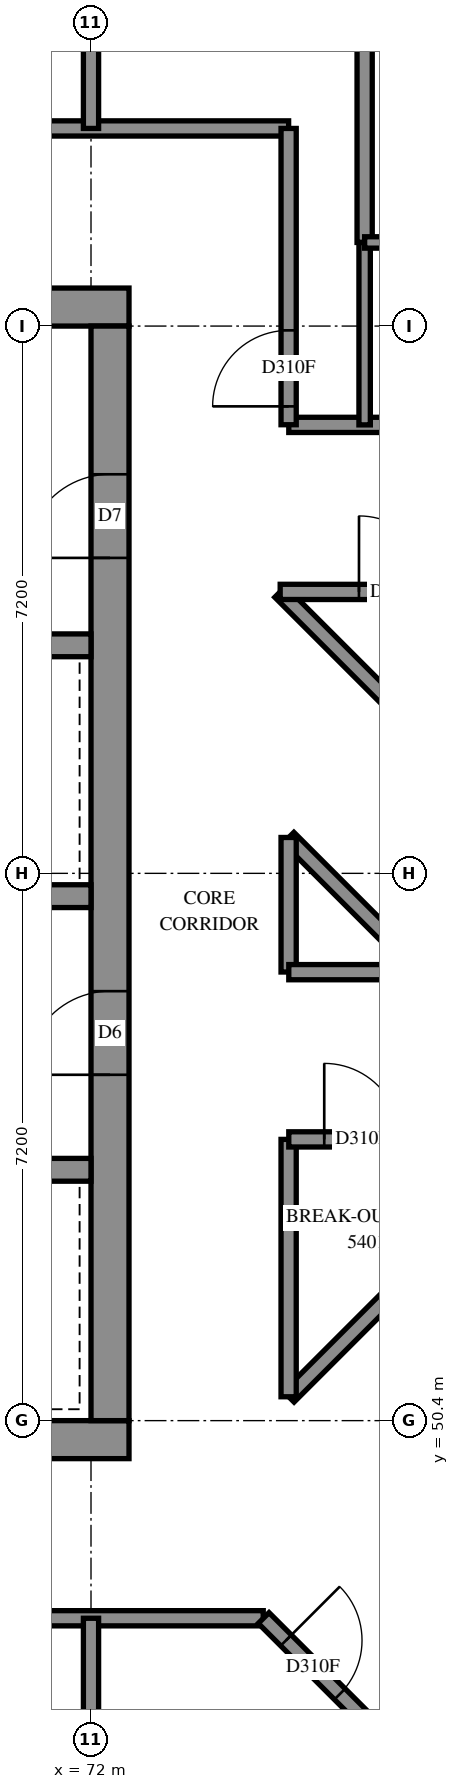
"""IFC4 building model, lengths in metres.
Left out: names, types, materials, properties, quantities, classifications, styles, units other than length and angle.
Written with IfcOpenShell. Run it as: python <this file> out.ifc"""

import sys

from ifc_helpers import new_model, si_unit, direction, frame, frame_2d, origin, place, context, subcontext, project, spatial, rectangle, extrude, element, fill, save


model = new_model("IFC4")
c1 = context("Model", 3, precision=1e-05, world=origin(), true_north=direction((0.0, 1.0)))
c2 = subcontext(c1, "Body", "Model", "MODEL_VIEW")
j1 = project(units=[si_unit("LENGTHUNIT", "METRE"), si_unit("PLANEANGLEUNIT", "RADIAN")], contexts=[c1])
p1 = place(None, origin())
s1 = spatial("IfcSite", under=j1, at=p1, CompositionType="ELEMENT")
p2 = place(p1, origin())
s2 = spatial("IfcBuilding", under=s1, at=p2, CompositionType="ELEMENT")
p3 = place(p2, frame((0.0, 0.0, 199.8)))
s3 = spatial("IfcBuildingStorey", under=s2, at=p3, CompositionType="ELEMENT", Elevation=199.8)
p4 = place(p3, frame((57.1, 50.15, -0.3), z_axis=(0.0, 0.0, 1.0), x_axis=(1.0, 0.0, 0.0)))
e1 = element("IfcWall", 1, at=p4, inside=s3, PredefinedType="SHEAR", context=c2, shape_type="SweptSolid", body=[
    extrude(rectangle(XDim=15.4, YDim=0.5, at=frame_2d((7.7, 0.0))), origin(), (0.0, 0.0, 1.0), 2.7),
])
p5 = place(p3, frame((57.1, 65.05, -0.3), z_axis=(0.0, 0.0, 1.0), x_axis=(1.0, 0.0, 0.0)))
e2 = element("IfcWall", 2, at=p5, inside=s3, PredefinedType="SHEAR", context=c2, shape_type="SweptSolid", body=[
    extrude(rectangle(XDim=15.4, YDim=0.5, at=frame_2d((7.7, 0.0))), origin(), (0.0, 0.0, 1.0), 2.7),
])
p6 = place(p5, frame((10.5, 0.0, 0.3)))
e3 = element("IfcOpeningElement", 3, at=p6, cuts=e2, PredefinedType="OPENING", context=c2, shape_type="SweptSolid", body=[
    extrude(rectangle(XDim=0.8, YDim=2.1, at=frame_2d((0.4, 1.05))), frame((0.0, 0.26, 0.0), z_axis=(0.0, -1.0, 0.0), x_axis=(1.0, 0.0, 0.0)), (0.0, 0.0, 1.0), 0.52),
])
p7 = place(p3, frame((72.25, 50.4, -0.3), z_axis=(0.0, 0.0, 1.0), x_axis=(0.0, 1.0, 0.0)))
e4 = element("IfcWall", 4, at=p7, inside=s3, PredefinedType="SHEAR", context=c2, shape_type="SweptSolid", body=[
    extrude(rectangle(XDim=14.4, YDim=0.5, at=frame_2d((7.2, 0.0))), origin(), (0.0, 0.0, 1.0), 2.7),
])
p8 = place(p7, frame((4.55, 0.0, 0.3)))
e5 = element("IfcOpeningElement", 5, at=p8, cuts=e4, PredefinedType="OPENING", context=c2, shape_type="SweptSolid", body=[
    extrude(rectangle(XDim=1.1, YDim=2.1, at=frame_2d((0.55, 1.05))), frame((0.0, 0.26, 0.0), z_axis=(0.0, -1.0, 0.0), x_axis=(1.0, 0.0, 0.0)), (0.0, 0.0, 1.0), 0.52),
])
p9 = place(p7, frame((11.35, 0.0, 0.3)))
e6 = element("IfcOpeningElement", 6, at=p9, cuts=e4, PredefinedType="OPENING", context=c2, shape_type="SweptSolid", body=[
    extrude(rectangle(XDim=1.1, YDim=2.1, at=frame_2d((0.55, 1.05))), frame((0.0, 0.26, 0.0), z_axis=(0.0, -1.0, 0.0), x_axis=(1.0, 0.0, 0.0)), (0.0, 0.0, 1.0), 0.52),
])
p10 = place(p3, frame((57.6, 53.7, 0.0), z_axis=(0.0, 0.0, 1.0), x_axis=(1.0, 0.0, 0.0)))
e7 = element("IfcWall", 7, at=p10, inside=s3, PredefinedType="SOLIDWALL", context=c2, shape_type="SweptSolid", body=[
    extrude(rectangle(XDim=14.4, YDim=0.3, at=frame_2d((7.2, 0.0))), origin(), (0.0, 0.0, 1.0), 3.1),
])
p11 = place(p10, frame((1.35, 0.0, 0.0)))
e8 = element("IfcOpeningElement", 8, at=p11, cuts=e7, PredefinedType="OPENING", context=c2, shape_type="SweptSolid", body=[
    extrude(rectangle(XDim=0.9, YDim=2.1, at=frame_2d((0.45, 1.05))), frame((0.0, 0.16, 0.0), z_axis=(0.0, -1.0, 0.0), x_axis=(1.0, 0.0, 0.0)), (0.0, 0.0, 1.0), 0.32),
])
p12 = place(p10, frame((4.95, 0.0, 0.0)))
e9 = element("IfcOpeningElement", 9, at=p12, cuts=e7, PredefinedType="OPENING", context=c2, shape_type="SweptSolid", body=[
    extrude(rectangle(XDim=0.9, YDim=2.1, at=frame_2d((0.45, 1.05))), frame((0.0, 0.16, 0.0), z_axis=(0.0, -1.0, 0.0), x_axis=(1.0, 0.0, 0.0)), (0.0, 0.0, 1.0), 0.32),
])
p13 = place(p10, frame((8.55, 0.0, 0.0)))
e10 = element("IfcOpeningElement", 10, at=p13, cuts=e7, PredefinedType="OPENING", context=c2, shape_type="SweptSolid", body=[
    extrude(rectangle(XDim=0.9, YDim=2.1, at=frame_2d((0.45, 1.05))), frame((0.0, 0.16, 0.0), z_axis=(0.0, -1.0, 0.0), x_axis=(1.0, 0.0, 0.0)), (0.0, 0.0, 1.0), 0.32),
])
p14 = place(p10, frame((12.05, 0.0, 0.0)))
e11 = element("IfcOpeningElement", 11, at=p14, cuts=e7, PredefinedType="OPENING", context=c2, shape_type="SweptSolid", body=[
    extrude(rectangle(XDim=1.1, YDim=2.1, at=frame_2d((0.55, 1.05))), frame((0.0, 0.16, 0.0), z_axis=(0.0, -1.0, 0.0), x_axis=(1.0, 0.0, 0.0)), (0.0, 0.0, 1.0), 0.32),
])
p15 = place(p3, frame((57.6, 57.3, 0.0), z_axis=(0.0, 0.0, 1.0), x_axis=(1.0, 0.0, 0.0)))
e12 = element("IfcWall", 12, at=p15, inside=s3, PredefinedType="SOLIDWALL", context=c2, shape_type="SweptSolid", body=[
    extrude(rectangle(XDim=14.4, YDim=0.3, at=frame_2d((7.2, 0.0))), origin(), (0.0, 0.0, 1.0), 3.1),
])
p16 = place(p15, frame((1.25, 0.0, 0.0)))
e13 = element("IfcOpeningElement", 13, at=p16, cuts=e12, PredefinedType="OPENING", context=c2, shape_type="SweptSolid", body=[
    extrude(rectangle(XDim=1.1, YDim=2.1, at=frame_2d((0.55, 1.05))), frame((0.0, 0.16, 0.0), z_axis=(0.0, -1.0, 0.0), x_axis=(1.0, 0.0, 0.0)), (0.0, 0.0, 1.0), 0.32),
])
p17 = place(p15, frame((4.85, 0.0, 0.0)))
e14 = element("IfcOpeningElement", 14, at=p17, cuts=e12, PredefinedType="OPENING", context=c2, shape_type="SweptSolid", body=[
    extrude(rectangle(XDim=1.1, YDim=2.1, at=frame_2d((0.55, 1.05))), frame((0.0, 0.16, 0.0), z_axis=(0.0, -1.0, 0.0), x_axis=(1.0, 0.0, 0.0)), (0.0, 0.0, 1.0), 0.32),
])
p18 = place(p15, frame((8.45, 0.0, 0.0)))
e15 = element("IfcOpeningElement", 15, at=p18, cuts=e12, PredefinedType="OPENING", context=c2, shape_type="SweptSolid", body=[
    extrude(rectangle(XDim=1.1, YDim=2.1, at=frame_2d((0.55, 1.05))), frame((0.0, 0.16, 0.0), z_axis=(0.0, -1.0, 0.0), x_axis=(1.0, 0.0, 0.0)), (0.0, 0.0, 1.0), 0.32),
])
p19 = place(p15, frame((12.05, 0.0, 0.0)))
e16 = element("IfcOpeningElement", 16, at=p19, cuts=e12, PredefinedType="OPENING", context=c2, shape_type="SweptSolid", body=[
    extrude(rectangle(XDim=1.1, YDim=2.1, at=frame_2d((0.55, 1.05))), frame((0.0, 0.16, 0.0), z_axis=(0.0, -1.0, 0.0), x_axis=(1.0, 0.0, 0.0)), (0.0, 0.0, 1.0), 0.32),
])
p20 = place(p3, frame((64.8, 60.6, 0.0), z_axis=(0.0, 0.0, 1.0), x_axis=(1.0, 0.0, 0.0)))
e17 = element("IfcWall", 17, at=p20, inside=s3, PredefinedType="SOLIDWALL", context=c2, shape_type="SweptSolid", body=[
    extrude(rectangle(XDim=7.2, YDim=0.3, at=frame_2d((3.6, 0.0))), origin(), (0.0, 0.0, 1.0), 3.1),
])
p21 = place(p3, frame((55.0, 67.4, 0.0), z_axis=(0.0, 0.0, 1.0), x_axis=(1.0, 0.0, 0.0)))
e18 = element("IfcWall", 18, at=p21, inside=s3, PredefinedType="PARTITIONING", context=c2, shape_type="SweptSolid", body=[
    extrude(rectangle(XDim=19.6, YDim=0.2, at=frame_2d((9.8, 0.0))), origin(), (0.0, 0.0, 1.0), 3.1),
])
p22 = place(p21, frame((6.499, 0.0, 0.0)))
e19 = element("IfcOpeningElement", 19, at=p22, cuts=e18, PredefinedType="OPENING", context=c2, shape_type="SweptSolid", body=[
    extrude(rectangle(XDim=0.9, YDim=2.1, at=frame_2d((0.45, 1.05))), frame((0.0, 0.11, 0.0), z_axis=(0.0, -1.0, 0.0), x_axis=(1.0, 0.0, 0.0)), (0.0, 0.0, 1.0), 0.22),
])
p23 = place(p21, frame((14.001, 0.0, 0.0)))
e20 = element("IfcOpeningElement", 20, at=p23, cuts=e18, PredefinedType="OPENING", context=c2, shape_type="SweptSolid", body=[
    extrude(rectangle(XDim=0.9, YDim=2.1, at=frame_2d((0.45, 1.05))), frame((0.0, 0.11, 0.0), z_axis=(0.0, -1.0, 0.0), x_axis=(1.0, 0.0, 0.0)), (0.0, 0.0, 1.0), 0.22),
])
p24 = place(p3, frame((55.0, 47.8, 0.0), z_axis=(0.0, 0.0, 1.0), x_axis=(1.0, 0.0, 0.0)))
e21 = element("IfcWall", 21, at=p24, inside=s3, PredefinedType="PARTITIONING", context=c2, shape_type="SweptSolid", body=[
    extrude(rectangle(XDim=19.266, YDim=0.2, at=frame_2d((9.633, 0.0))), origin(), (0.0, 0.0, 1.0), 3.1),
])
p25 = place(p24, frame((4.9, 0.0, 0.0)))
e22 = element("IfcOpeningElement", 22, at=p25, cuts=e21, PredefinedType="OPENING", context=c2, shape_type="SweptSolid", body=[
    extrude(rectangle(XDim=0.9, YDim=2.1, at=frame_2d((0.45, 1.05))), frame((0.0, 0.11, 0.0), z_axis=(0.0, -1.0, 0.0), x_axis=(1.0, 0.0, 0.0)), (0.0, 0.0, 1.0), 0.22),
])
p26 = place(p24, frame((6.6, 0.0, 0.0)))
e23 = element("IfcOpeningElement", 23, at=p26, cuts=e21, PredefinedType="OPENING", context=c2, shape_type="SweptSolid", body=[
    extrude(rectangle(XDim=0.9, YDim=2.1, at=frame_2d((0.45, 1.05))), frame((0.0, 0.11, 0.0), z_axis=(0.0, -1.0, 0.0), x_axis=(1.0, 0.0, 0.0)), (0.0, 0.0, 1.0), 0.22),
])
p27 = place(p24, frame((13.743, 0.0, 0.0)))
e24 = element("IfcOpeningElement", 24, at=p27, cuts=e21, PredefinedType="OPENING", context=c2, shape_type="SweptSolid", body=[
    extrude(rectangle(XDim=0.9, YDim=2.1, at=frame_2d((0.45, 1.05))), frame((0.0, 0.11, 0.0), z_axis=(0.0, -1.0, 0.0), x_axis=(1.0, 0.0, 0.0)), (0.0, 0.0, 1.0), 0.22),
])
p28 = place(p3, frame((75.6, 65.9, 0.0), z_axis=(0.0, 0.0, 1.0), x_axis=(0.0, 1.0, 0.0)))
e25 = element("IfcWall", 25, at=p28, inside=s3, PredefinedType="PARTITIONING", context=c2, shape_type="SweptSolid", body=[
    extrude(rectangle(XDim=6.871, YDim=0.2, at=frame_2d((3.435, 0.0))), origin(), (0.0, 0.0, 1.0), 3.1),
])
p29 = place(p3, frame((74.489, 61.303, 0.0), z_axis=(0.0, 0.0, 1.0), x_axis=(0.7071892763, -0.7070242765, 0.0)))
e26 = element("IfcWall", 26, at=p29, inside=s3, PredefinedType="PARTITIONING", context=c2, shape_type="SweptSolid", body=[
    extrude(rectangle(XDim=6.667, YDim=0.2, at=frame_2d((3.333, 0.0))), origin(), (0.0, 0.0, 1.0), 3.1),
])
p30 = place(p3, frame((74.601, 50.715, 0.0), z_axis=(0.0, 0.0, 1.0), x_axis=(0.7071067812, 0.7071067812, 0.0)))
e27 = element("IfcWall", 27, at=p30, inside=s3, PredefinedType="PARTITIONING", context=c2, shape_type="SweptSolid", body=[
    extrude(rectangle(XDim=4.786, YDim=0.2, at=frame_2d((2.393, 0.0))), origin(), (0.0, 0.0, 1.0), 3.1),
])
p31 = place(p3, frame((74.489, 61.303, 0.0), z_axis=(0.0, 0.0, 1.0), x_axis=(0.9999998105, -0.0006155543, 0.0)))
e28 = element("IfcWall", 28, at=p31, inside=s3, PredefinedType="PARTITIONING", context=c2, shape_type="SweptSolid", body=[
    extrude(rectangle(XDim=4.711, YDim=0.2, at=frame_2d((2.356, 0.0))), origin(), (0.0, 0.0, 1.0), 3.1),
])
p32 = place(p31, frame((1.037, 0.0, 0.0)))
e29 = element("IfcOpeningElement", 29, at=p32, cuts=e28, PredefinedType="OPENING", context=c2, shape_type="SweptSolid", body=[
    extrude(rectangle(XDim=1.0, YDim=2.1, at=frame_2d((0.5, 1.05))), frame((0.0, 0.11, 0.0), z_axis=(0.0, -1.0, 0.0), x_axis=(1.0, 0.0, 0.0)), (0.0, 0.0, 1.0), 0.22),
])
p33 = place(p3, frame((74.272, 47.803, 0.0), z_axis=(0.0, 0.0, 1.0), x_axis=(0.7071067812, -0.7071067812, 0.0)))
e30 = element("IfcWall", 30, at=p33, inside=s3, PredefinedType="PARTITIONING", context=c2, shape_type="SweptSolid", body=[
    extrude(rectangle(XDim=4.641, YDim=0.2, at=frame_2d((2.321, 0.0))), origin(), (0.0, 0.0, 1.0), 3.1),
])
p34 = place(p33, frame((0.416, 0.0, 0.0)))
e31 = element("IfcOpeningElement", 31, at=p34, cuts=e30, PredefinedType="OPENING", context=c2, shape_type="SweptSolid", body=[
    extrude(rectangle(XDim=1.0, YDim=2.1, at=frame_2d((0.5, 1.05))), frame((0.0, 0.11, 0.0), z_axis=(0.0, -1.0, 0.0), x_axis=(1.0, 0.0, 0.0)), (0.0, 0.0, 1.0), 0.22),
])
p35 = place(p3, frame((74.602, 63.5, 0.0), z_axis=(0.0, 0.0, 1.0), x_axis=(1.0, 0.0, 0.0)))
e32 = element("IfcWall", 32, at=p35, inside=s3, PredefinedType="PARTITIONING", context=c2, shape_type="SweptSolid", body=[
    extrude(rectangle(XDim=4.598, YDim=0.2, at=frame_2d((2.299, 0.0))), origin(), (0.0, 0.0, 1.0), 3.1),
])
p36 = place(p35, frame((3.298, 0.0, 0.0)))
e33 = element("IfcOpeningElement", 33, at=p36, cuts=e32, PredefinedType="OPENING", context=c2, shape_type="SweptSolid", body=[
    extrude(rectangle(XDim=0.9, YDim=2.1, at=frame_2d((0.45, 1.05))), frame((0.0, 0.11, 0.0), z_axis=(0.0, -1.0, 0.0), x_axis=(1.0, 0.0, 0.0)), (0.0, 0.0, 1.0), 0.22),
])
p37 = place(p3, frame((72.0, 43.6, 0.0), z_axis=(0.0, 0.0, 1.0), x_axis=(0.0, 1.0, 0.0)))
e34 = element("IfcWall", 34, at=p37, inside=s3, PredefinedType="PARTITIONING", context=c2, shape_type="SweptSolid", body=[
    extrude(rectangle(XDim=4.2, YDim=0.2, at=frame_2d((2.1, 0.0))), origin(), (0.0, 0.0, 1.0), 3.1),
])
p38 = place(p3, frame((72.0, 67.4, 0.0), z_axis=(0.0, 0.0, 1.0), x_axis=(0.0, 1.0, 0.0)))
e35 = element("IfcWall", 35, at=p38, inside=s3, PredefinedType="PARTITIONING", context=c2, shape_type="SweptSolid", body=[
    extrude(rectangle(XDim=4.096, YDim=0.2, at=frame_2d((2.048, 0.0))), origin(), (0.0, 0.0, 1.0), 3.1),
])
p39 = place(p3, frame((74.6, 63.502, 0.0), z_axis=(0.0, 0.0, 1.0), x_axis=(0.0, 1.0, 0.0)))
e36 = element("IfcWall", 36, at=p39, inside=s3, PredefinedType="PARTITIONING", context=c2, shape_type="SweptSolid", body=[
    extrude(rectangle(XDim=3.898, YDim=0.2, at=frame_2d((1.949, 0.0))), origin(), (0.0, 0.0, 1.0), 3.1),
])
p40 = place(p39, frame((0.242, 0.0, 0.0)))
e37 = element("IfcOpeningElement", 37, at=p40, cuts=e36, PredefinedType="OPENING", context=c2, shape_type="SweptSolid", body=[
    extrude(rectangle(XDim=1.0, YDim=2.1, at=frame_2d((0.5, 1.05))), frame((0.0, 0.11, 0.0), z_axis=(0.0, -1.0, 0.0), x_axis=(1.0, 0.0, 0.0)), (0.0, 0.0, 1.0), 0.22),
])
p41 = place(p3, frame((74.6, 50.714, 0.0), z_axis=(0.0, 0.0, 1.0), x_axis=(0.0, 1.0, 0.0)))
e38 = element("IfcWall", 38, at=p41, inside=s3, PredefinedType="PARTITIONING", context=c2, shape_type="SweptSolid", body=[
    extrude(rectangle(XDim=3.386, YDim=0.2, at=frame_2d((1.693, 0.0))), origin(), (0.0, 0.0, 1.0), 3.1),
])
p42 = place(p3, frame((74.602, 54.1, 0.0), z_axis=(0.0, 0.0, 1.0), x_axis=(1.0, 0.0, 0.0)))
e39 = element("IfcWall", 39, at=p42, inside=s3, PredefinedType="PARTITIONING", context=c2, shape_type="SweptSolid", body=[
    extrude(rectangle(XDim=3.384, YDim=0.2, at=frame_2d((1.692, 0.0))), origin(), (0.0, 0.0, 1.0), 3.1),
])
p43 = place(p42, frame((0.467, 0.0, 0.0)))
e40 = element("IfcOpeningElement", 40, at=p43, cuts=e39, PredefinedType="OPENING", context=c2, shape_type="SweptSolid", body=[
    extrude(rectangle(XDim=1.0, YDim=2.1, at=frame_2d((0.5, 1.05))), frame((0.0, 0.11, 0.0), z_axis=(0.0, -1.0, 0.0), x_axis=(1.0, 0.0, 0.0)), (0.0, 0.0, 1.0), 0.22),
])
p44 = place(p3, frame((74.599, 58.069, 0.0), z_axis=(0.0, 0.0, 1.0), x_axis=(0.7071067812, -0.7071067812, 0.0)))
e41 = element("IfcWall", 41, at=p44, inside=s3, PredefinedType="PARTITIONING", context=c2, shape_type="SweptSolid", body=[
    extrude(rectangle(XDim=2.503, YDim=0.2, at=frame_2d((1.252, 0.0))), origin(), (0.0, 0.0, 1.0), 3.1),
])
p45 = place(p3, frame((75.6, 63.5, 0.0), z_axis=(0.0, 0.0, 1.0), x_axis=(0.0, 1.0, 0.0)))
e42 = element("IfcWall", 42, at=p45, inside=s3, PredefinedType="PARTITIONING", context=c2, shape_type="SweptSolid", body=[
    extrude(rectangle(XDim=2.4, YDim=0.15, at=frame_2d((1.2, 0.0))), origin(), (0.0, 0.0, 1.0), 3.1),
])
p46 = place(p3, frame((75.6, 65.9, 0.0), z_axis=(0.0, 0.0, 1.0), x_axis=(1.0, 0.0, 0.0)))
e43 = element("IfcWall", 43, at=p46, inside=s3, PredefinedType="PARTITIONING", context=c2, shape_type="SweptSolid", body=[
    extrude(rectangle(XDim=1.9, YDim=0.15, at=frame_2d((0.95, 0.0))), origin(), (0.0, 0.0, 1.0), 3.1),
])
p47 = place(p46, frame((0.502, 0.0, 0.0)))
e44 = element("IfcOpeningElement", 44, at=p47, cuts=e43, PredefinedType="OPENING", context=c2, shape_type="SweptSolid", body=[
    extrude(rectangle(XDim=0.8, YDim=2.1, at=frame_2d((0.4, 1.05))), frame((0.0, 0.085, 0.0), z_axis=(0.0, -1.0, 0.0), x_axis=(1.0, 0.0, 0.0)), (0.0, 0.0, 1.0), 0.17),
])
for number, where, z_axis, x_axis in (
    (45, (74.6, 56.302, 0.0), (0.0, 0.0, 1.0), (0.0, 1.0, 0.0)),
    (46, (74.602, 56.3, 0.0), (0.0, 0.0, 1.0), (1.0, 0.0, 0.0)),
):
    element("IfcWall", number, at=place(p3, frame(where, z_axis=z_axis, x_axis=x_axis)), inside=s3, PredefinedType="PARTITIONING", context=c2, shape_type="SweptSolid", body=[
        extrude(rectangle(XDim=1.77, YDim=0.2, at=frame_2d((0.885, 0.0))), origin(), (0.0, 0.0, 1.0), 3.1),
    ])
p48 = place(p8, origin())
e47 = element("IfcDoor", 47, at=p48, inside=s3, OperationType="DOUBLE_DOOR_SINGLE_SWING", PredefinedType="DOOR", context=c2, shape_type="SweptSolid", body=[
    extrude(rectangle(XDim=1.1, YDim=2.1, at=frame_2d((0.55, 1.05))), frame((0.0, 0.025, 0.0), z_axis=(0.0, -1.0, 0.0), x_axis=(1.0, 0.0, 0.0)), (0.0, 0.0, 1.0), 0.05),
])
fill(e5, e47)
p49 = place(p9, origin())
e48 = element("IfcDoor", 48, at=p49, inside=s3, OperationType="SINGLE_SWING_RIGHT", PredefinedType="DOOR", context=c2, shape_type="SweptSolid", body=[
    extrude(rectangle(XDim=1.1, YDim=2.1, at=frame_2d((0.55, 1.05))), frame((0.0, 0.025, 0.0), z_axis=(0.0, -1.0, 0.0), x_axis=(1.0, 0.0, 0.0)), (0.0, 0.0, 1.0), 0.05),
])
fill(e6, e48)
p50 = place(p43, origin())
e49 = element("IfcDoor", 49, at=p50, inside=s3, OperationType="SINGLE_SWING_RIGHT", PredefinedType="DOOR", context=c2, shape_type="SweptSolid", body=[
    extrude(rectangle(XDim=1.0, YDim=2.1, at=frame_2d((0.5, 1.05))), frame((0.0, 0.025, 0.0), z_axis=(0.0, -1.0, 0.0), x_axis=(1.0, 0.0, 0.0)), (0.0, 0.0, 1.0), 0.05),
])
fill(e40, e49)
p51 = place(p40, origin())
e50 = element("IfcDoor", 50, at=p51, inside=s3, OperationType="SINGLE_SWING_RIGHT", PredefinedType="DOOR", context=c2, shape_type="SweptSolid", body=[
    extrude(rectangle(XDim=1.0, YDim=2.1, at=frame_2d((0.5, 1.05))), frame((0.0, 0.025, 0.0), z_axis=(0.0, -1.0, 0.0), x_axis=(1.0, 0.0, 0.0)), (0.0, 0.0, 1.0), 0.05),
])
fill(e37, e50)
p52 = place(p32, origin())
e51 = element("IfcDoor", 51, at=p52, inside=s3, OperationType="SINGLE_SWING_RIGHT", PredefinedType="DOOR", context=c2, shape_type="SweptSolid", body=[
    extrude(rectangle(XDim=1.0, YDim=2.1, at=frame_2d((0.5, 1.05))), frame((0.0, 0.025, 0.0), z_axis=(0.0, -1.0, 0.0), x_axis=(1.0, 0.0, 0.0)), (0.0, 0.0, 1.0), 0.05),
])
fill(e29, e51)
p53 = place(p34, origin())
e52 = element("IfcDoor", 52, at=p53, inside=s3, OperationType="SINGLE_SWING_LEFT", PredefinedType="DOOR", context=c2, shape_type="SweptSolid", body=[
    extrude(rectangle(XDim=1.0, YDim=2.1, at=frame_2d((0.5, 1.05))), frame((0.0, 0.025, 0.0), z_axis=(0.0, -1.0, 0.0), x_axis=(1.0, 0.0, 0.0)), (0.0, 0.0, 1.0), 0.05),
])
fill(e31, e52)
save(model, sys.argv[1])
